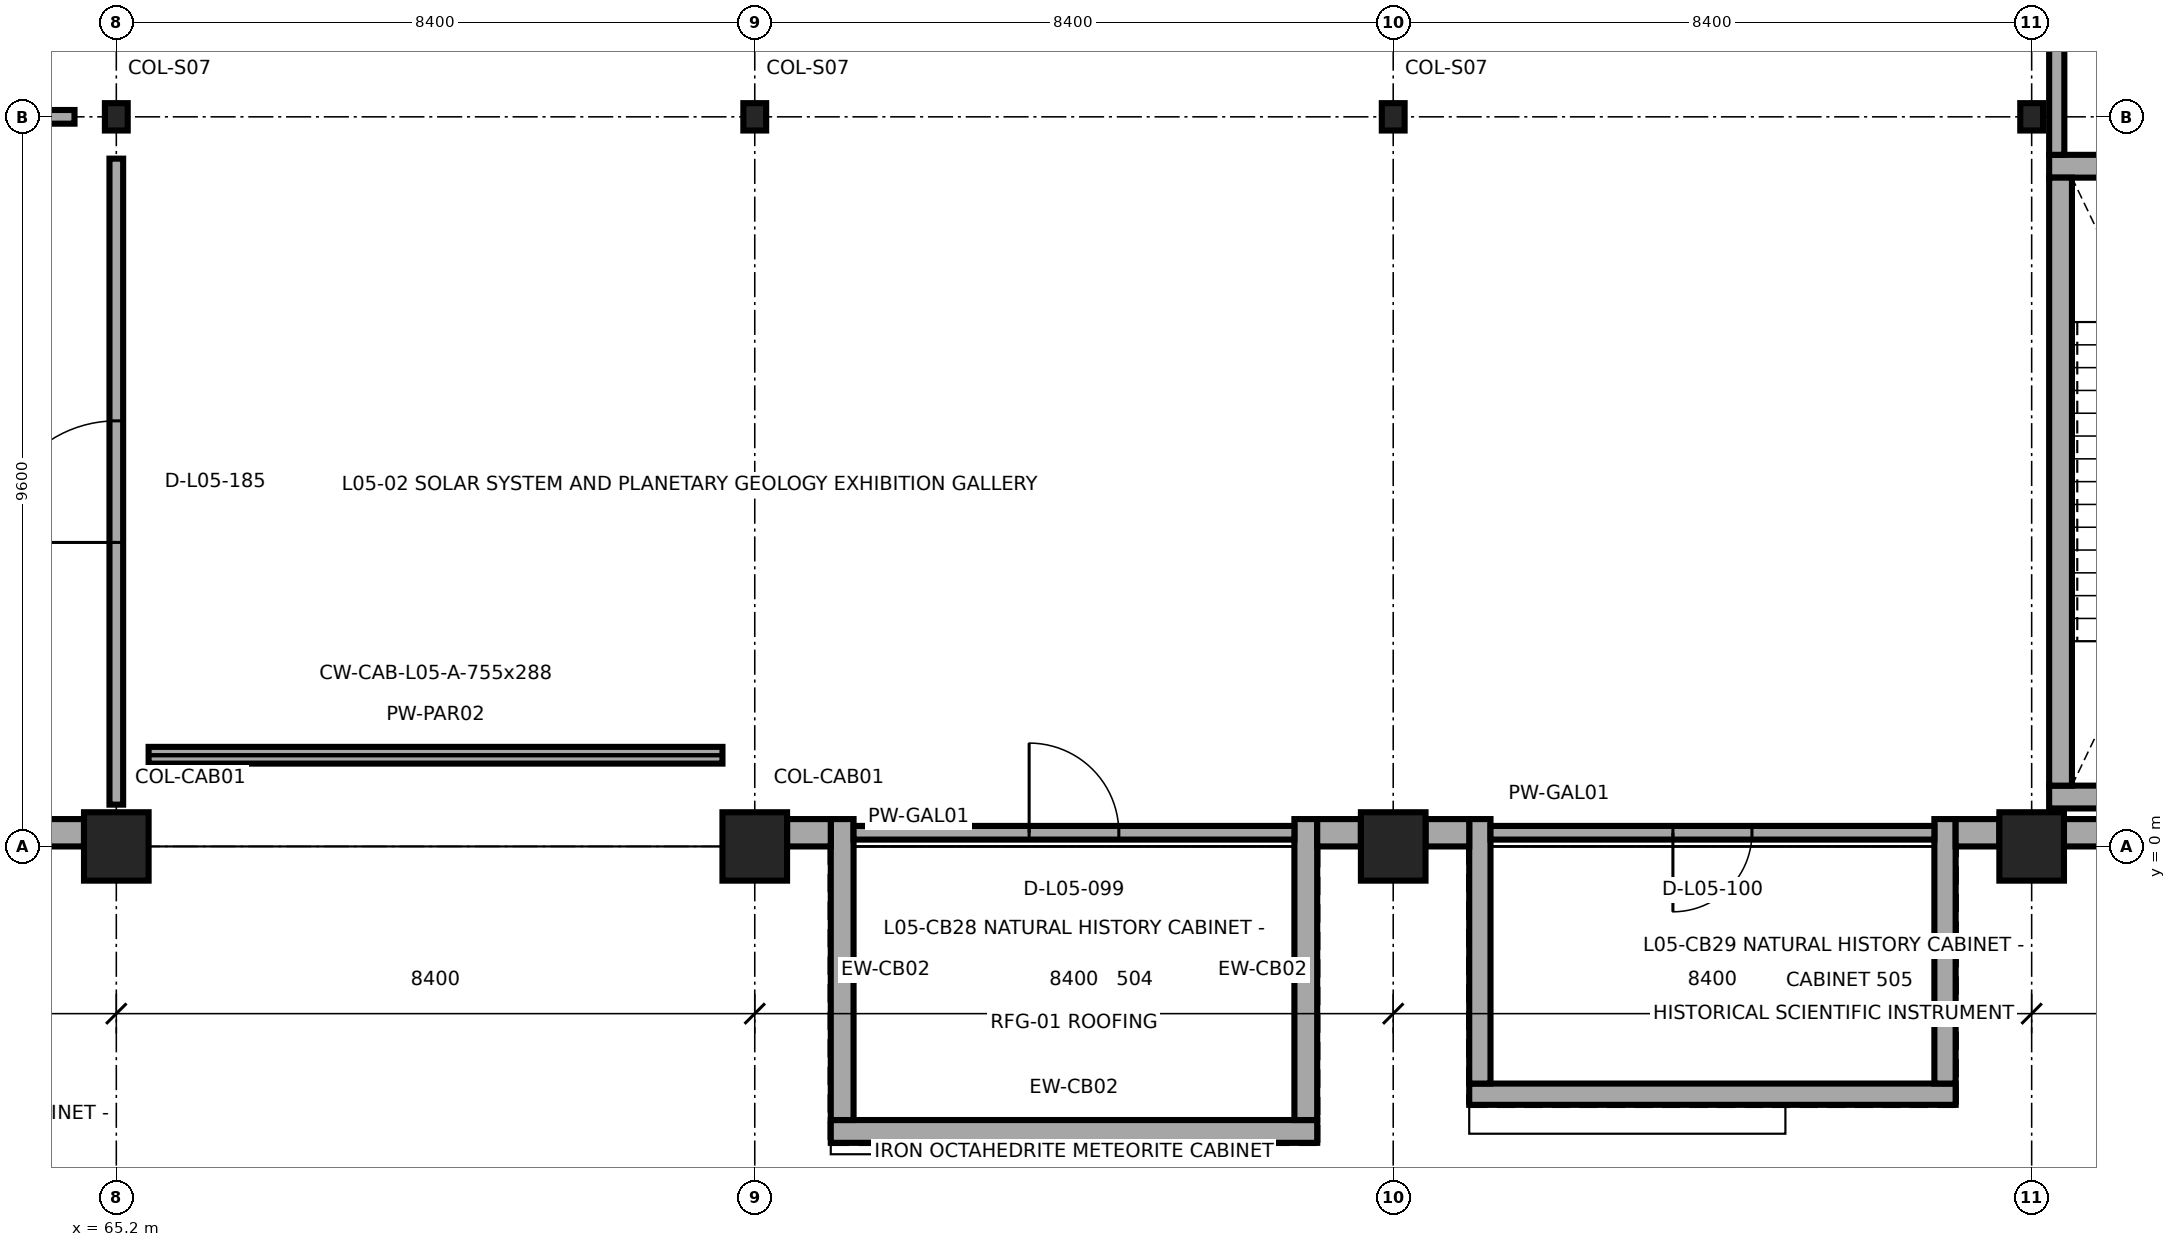
"""IFC4 building model, lengths in metres.
Left out: names, types, materials, properties, quantities, classifications, styles, units other than length and angle.
Written with IfcOpenShell. Run it as: python <this file> out.ifc"""

import sys

from ifc_helpers import new_model, si_unit, direction, frame, frame_2d, origin, origin_2d, place, context, subcontext, project, spatial, rectangle, i_section, extrude, element, fill, save


model = new_model("IFC4")
c1 = context("Model", 3, precision=1e-05, world=origin(), true_north=direction((0.0, 1.0)))
c2 = subcontext(c1, "Body", "Model", "MODEL_VIEW")
j1 = project(units=[si_unit("LENGTHUNIT", "METRE"), si_unit("PLANEANGLEUNIT", "RADIAN")], contexts=[c1])
p1 = place(None, origin())
s1 = spatial("IfcSite", under=j1, at=p1, CompositionType="ELEMENT")
p2 = place(p1, origin())
s2 = spatial("IfcBuilding", under=s1, at=p2, CompositionType="ELEMENT")
p3 = place(p2, frame((0.0, 0.0, 26.4)))
s3 = spatial("IfcBuildingStorey", under=s2, at=p3, CompositionType="ELEMENT", Elevation=26.4)
p4 = place(p3, frame((65.2, 0.0, 0.0), z_axis=(0.0, 0.0, 1.0), x_axis=(1.0, 0.0, 0.0)))
e1 = element("IfcColumn", 1, at=p4, inside=s3, PredefinedType="COLUMN", context=c2, shape_type="SweptSolid", body=[
    extrude(rectangle(XDim=0.85, YDim=0.9, at=origin_2d()), origin(), (0.0, 0.0, 1.0), 4.8),
])
p5 = place(p3, frame((65.2, 9.6, 0.0), z_axis=(0.0, 0.0, 1.0), x_axis=(1.0, 0.0, 0.0)))
e2 = element("IfcColumn", 2, at=p5, inside=s3, PredefinedType="COLUMN", context=c2, shape_type="SweptSolid", body=[
    extrude(i_section(OverallWidth=0.3, OverallDepth=0.36, WebThickness=0.012, FlangeThickness=0.022, FilletRadius=0.027, at=origin_2d()), origin(), (0.0, 0.0, 1.0), 4.8),
])
p6 = place(p3, frame((73.6, 0.0, 0.0), z_axis=(0.0, 0.0, 1.0), x_axis=(1.0, 0.0, 0.0)))
e3 = element("IfcColumn", 3, at=p6, inside=s3, PredefinedType="COLUMN", context=c2, shape_type="SweptSolid", body=[
    extrude(rectangle(XDim=0.85, YDim=0.9, at=origin_2d()), origin(), (0.0, 0.0, 1.0), 4.8),
])
p7 = place(p3, frame((73.6, 9.6, 0.0), z_axis=(0.0, 0.0, 1.0), x_axis=(1.0, 0.0, 0.0)))
e4 = element("IfcColumn", 4, at=p7, inside=s3, PredefinedType="COLUMN", context=c2, shape_type="SweptSolid", body=[
    extrude(i_section(OverallWidth=0.3, OverallDepth=0.36, WebThickness=0.012, FlangeThickness=0.022, FilletRadius=0.027, at=origin_2d()), origin(), (0.0, 0.0, 1.0), 4.8),
])
p8 = place(p3, frame((82.0, 0.0, 0.0), z_axis=(0.0, 0.0, 1.0), x_axis=(1.0, 0.0, 0.0)))
e5 = element("IfcColumn", 5, at=p8, inside=s3, PredefinedType="COLUMN", context=c2, shape_type="SweptSolid", body=[
    extrude(rectangle(XDim=0.85, YDim=0.9, at=origin_2d()), origin(), (0.0, 0.0, 1.0), 4.8),
])
p9 = place(p3, frame((82.0, 9.6, 0.0), z_axis=(0.0, 0.0, 1.0), x_axis=(1.0, 0.0, 0.0)))
e6 = element("IfcColumn", 6, at=p9, inside=s3, PredefinedType="COLUMN", context=c2, shape_type="SweptSolid", body=[
    extrude(i_section(OverallWidth=0.3, OverallDepth=0.36, WebThickness=0.012, FlangeThickness=0.022, FilletRadius=0.027, at=origin_2d()), origin(), (0.0, 0.0, 1.0), 4.8),
])
p10 = place(p3, frame((90.4, 0.0, 0.0), z_axis=(0.0, 0.0, 1.0), x_axis=(1.0, 0.0, 0.0)))
e7 = element("IfcColumn", 7, at=p10, inside=s3, PredefinedType="COLUMN", context=c2, shape_type="SweptSolid", body=[
    extrude(rectangle(XDim=0.85, YDim=0.9, at=origin_2d()), origin(), (0.0, 0.0, 1.0), 4.8),
])
p11 = place(p3, frame((90.4, 9.6, 0.0), z_axis=(0.0, 0.0, 1.0), x_axis=(1.0, 0.0, 0.0)))
e8 = element("IfcColumn", 8, at=p11, inside=s3, PredefinedType="COLUMN", context=c2, shape_type="SweptSolid", body=[
    extrude(i_section(OverallWidth=0.3, OverallDepth=0.36, WebThickness=0.012, FlangeThickness=0.022, FilletRadius=0.027, at=origin_2d()), origin(), (0.0, 0.0, 1.0), 4.8),
])
p12 = place(p3, frame((74.6, -3.75, 0.0), z_axis=(0.0, 0.0, 1.0), x_axis=(1.0, 0.0, 0.0)))
e9 = element("IfcWall", 9, at=p12, inside=s3, PredefinedType="SOLIDWALL", context=c2, shape_type="SweptSolid", body=[
    extrude(rectangle(XDim=6.4, YDim=0.3, at=frame_2d((3.2, 0.0))), origin(), (0.0, 0.0, 1.0), 2.99),
])
for number, where, z_axis, x_axis in (
    (10, (74.75, 0.36, 0.0), (0.0, 0.0, 1.0), (0.0, -1.0, 0.0)),
    (11, (80.85, -3.6, 0.0), (0.0, 0.0, 1.0), (0.0, 1.0, 0.0)),
):
    element("IfcWall", number, at=place(p3, frame(where, z_axis=z_axis, x_axis=x_axis)), inside=s3, PredefinedType="SOLIDWALL", context=c2, shape_type="SweptSolid", body=[
        extrude(rectangle(XDim=3.96, YDim=0.3, at=frame_2d((1.98, 0.0))), origin(), (0.0, 0.0, 1.0), 2.99),
    ])
p13 = place(p3, frame((83.0, -3.26, 0.0), z_axis=(0.0, 0.0, 1.0), x_axis=(1.0, 0.0, 0.0)))
e12 = element("IfcWall", 12, at=p13, inside=s3, PredefinedType="SOLIDWALL", context=c2, shape_type="SweptSolid", body=[
    extrude(rectangle(XDim=6.4, YDim=0.28, at=frame_2d((3.2, 0.0))), origin(), (0.0, 0.0, 1.0), 2.99),
])
for number, where, z_axis, x_axis in (
    (13, (83.14, 0.36, 0.0), (0.0, 0.0, 1.0), (0.0, -1.0, 0.0)),
    (14, (89.26, -3.12, 0.0), (0.0, 0.0, 1.0), (0.0, 1.0, 0.0)),
):
    element("IfcWall", number, at=place(p3, frame(where, z_axis=z_axis, x_axis=x_axis)), inside=s3, PredefinedType="SOLIDWALL", context=c2, shape_type="SweptSolid", body=[
        extrude(rectangle(XDim=3.48, YDim=0.28, at=frame_2d((1.74, 0.0))), origin(), (0.0, 0.0, 1.0), 2.99),
    ])
p14 = place(p3, frame((64.2, 0.18, 0.0), z_axis=(0.0, 0.0, 1.0), x_axis=(1.0, 0.0, 0.0)))
e15 = element("IfcWall", 15, at=p14, inside=s3, PredefinedType="SOLIDWALL", context=c2, shape_type="SweptSolid", body=[
    extrude(rectangle(XDim=0.575, YDim=0.36, at=frame_2d((0.288, 0.0))), origin(), (0.0, 0.0, 1.0), 3.625),
])
p15 = place(p3, frame((65.625, 1.2, -0.002), z_axis=(0.0, 0.0, 1.0), x_axis=(1.0, 0.0, 0.0)))
e16 = element("IfcWall", 16, at=p15, inside=s3, PredefinedType="PARAPET", context=c2, shape_type="SweptSolid", body=[
    extrude(rectangle(XDim=7.55, YDim=0.22, at=frame_2d((3.775, 0.0))), origin(), (0.0, 0.0, 1.0), 0.746),
])
p16 = place(p3, frame((74.025, 0.18, 0.0), z_axis=(0.0, 0.0, 1.0), x_axis=(1.0, 0.0, 0.0)))
e17 = element("IfcWall", 17, at=p16, inside=s3, PredefinedType="SOLIDWALL", context=c2, shape_type="SweptSolid", body=[
    extrude(rectangle(XDim=0.575, YDim=0.36, at=frame_2d((0.288, 0.0))), origin(), (0.0, 0.0, 1.0), 3.625),
])
for number, where, z_axis, x_axis in (
    (18, (81.0, 0.18, 0.0), (0.0, 0.0, 1.0), (1.0, 0.0, 0.0)),
    (19, (82.425, 0.18, 0.0), (0.0, 0.0, 1.0), (1.0, 0.0, 0.0)),
):
    element("IfcWall", number, at=place(p3, frame(where, z_axis=z_axis, x_axis=x_axis)), inside=s3, PredefinedType="SOLIDWALL", context=c2, shape_type="SweptSolid", body=[
        extrude(rectangle(XDim=0.575, YDim=0.36, at=frame_2d((0.288, 0.0))), origin(), (0.0, 0.0, 1.0), 3.625),
    ])
p17 = place(p3, frame((89.4, 0.18, 0.0), z_axis=(0.0, 0.0, 1.0), x_axis=(1.0, 0.0, 0.0)))
e20 = element("IfcWall", 20, at=p17, inside=s3, PredefinedType="SOLIDWALL", context=c2, shape_type="SweptSolid", body=[
    extrude(rectangle(XDim=0.575, YDim=0.36, at=frame_2d((0.288, 0.0))), origin(), (0.0, 0.0, 1.0), 3.625),
])
p18 = place(p3, frame((90.825, 0.18, 0.0), z_axis=(0.0, 0.0, 1.0), x_axis=(1.0, 0.0, 0.0)))
e21 = element("IfcWall", 21, at=p18, inside=s3, PredefinedType="SOLIDWALL", context=c2, shape_type="SweptSolid", body=[
    extrude(rectangle(XDim=7.55, YDim=0.36, at=frame_2d((3.775, 0.0))), origin(), (0.0, 0.0, 1.0), 3.625),
])
p19 = place(p3, frame((90.63, 0.65, 0.0), z_axis=(0.0, 0.0, 1.0), x_axis=(1.0, 0.0, 0.0)))
e22 = element("IfcWall", 22, at=p19, inside=s3, PredefinedType="SHEAR", context=c2, shape_type="SweptSolid", body=[
    extrude(rectangle(XDim=7.94, YDim=0.3, at=frame_2d((3.97, 0.0))), origin(), (0.0, 0.0, 1.0), 4.54),
])
p20 = place(p3, frame((98.57, 8.95, 0.0), z_axis=(0.0, 0.0, 1.0), x_axis=(-1.0, 0.0, 0.0)))
e23 = element("IfcWall", 23, at=p20, inside=s3, PredefinedType="SHEAR", context=c2, shape_type="SweptSolid", body=[
    extrude(rectangle(XDim=7.94, YDim=0.3, at=frame_2d((3.97, 0.0))), origin(), (0.0, 0.0, 1.0), 4.54),
])
p21 = place(p20, frame((5.17, 0.0, 0.0)))
e24 = element("IfcOpeningElement", 24, at=p21, cuts=e23, PredefinedType="OPENING", context=c2, shape_type="SweptSolid", body=[
    extrude(rectangle(XDim=1.1, YDim=2.2, at=frame_2d((0.55, 1.1))), frame((0.0, 0.16, 0.0), z_axis=(0.0, -1.0, 0.0), x_axis=(1.0, 0.0, 0.0)), (0.0, 0.0, 1.0), 0.32),
])
p22 = place(p20, frame((2.09, 0.0, 0.0)))
e25 = element("IfcOpeningElement", 25, at=p22, cuts=e23, PredefinedType="OPENING", context=c2, shape_type="SweptSolid", body=[
    extrude(rectangle(XDim=1.1, YDim=2.1, at=frame_2d((0.55, 1.05))), frame((0.0, 0.16, 0.0), z_axis=(0.0, -1.0, 0.0), x_axis=(1.0, 0.0, 0.0)), (0.0, 0.0, 1.0), 0.32),
])
p23 = place(p20, frame((0.365, 0.0, 0.0)))
e26 = element("IfcOpeningElement", 26, at=p23, cuts=e23, PredefinedType="OPENING", context=c2, shape_type="SweptSolid", body=[
    extrude(rectangle(XDim=1.1, YDim=2.1, at=frame_2d((0.55, 1.05))), frame((0.0, 0.16, 0.0), z_axis=(0.0, -1.0, 0.0), x_axis=(1.0, 0.0, 0.0)), (0.0, 0.0, 1.0), 0.32),
])
p24 = place(p3, frame((90.78, 8.8, 0.0), z_axis=(0.0, 0.0, 1.0), x_axis=(0.0, -1.0, 0.0)))
e27 = element("IfcWall", 27, at=p24, inside=s3, PredefinedType="SHEAR", context=c2, shape_type="SweptSolid", body=[
    extrude(rectangle(XDim=8.0, YDim=0.3, at=frame_2d((4.0, 0.0))), origin(), (0.0, 0.0, 1.0), 4.54),
])
p25 = place(p3, frame((90.73, 9.1, 0.0), z_axis=(0.0, 0.0, 1.0), x_axis=(0.0, 1.0, 0.0)))
e28 = element("IfcWall", 28, at=p25, inside=s3, PredefinedType="SOLIDWALL", context=c2, shape_type="SweptSolid", body=[
    extrude(rectangle(XDim=2.9, YDim=0.2, at=frame_2d((1.45, 0.0))), origin(), (0.0, 0.0, 1.0), 4.022),
])
p26 = place(p3, frame((74.9, 0.18, 0.0), z_axis=(0.0, 0.0, 1.0), x_axis=(1.0, 0.0, 0.0)))
e29 = element("IfcWall", 29, at=p26, inside=s3, PredefinedType="PARTITIONING", context=c2, shape_type="SweptSolid", body=[
    extrude(rectangle(XDim=5.8, YDim=0.18, at=frame_2d((2.9, 0.0))), origin(), (0.0, 0.0, 1.0), 2.99),
])
p27 = place(p26, frame((2.31, 0.0, 0.0)))
e30 = element("IfcOpeningElement", 30, at=p27, cuts=e29, PredefinedType="OPENING", context=c2, shape_type="SweptSolid", body=[
    extrude(rectangle(XDim=1.18, YDim=2.25, at=frame_2d((0.59, 1.125))), frame((0.0, 0.1, 0.0), z_axis=(0.0, -1.0, 0.0), x_axis=(1.0, 0.0, 0.0)), (0.0, 0.0, 1.0), 0.2),
])
p28 = place(p3, frame((83.28, 0.18, 0.0), z_axis=(0.0, 0.0, 1.0), x_axis=(1.0, 0.0, 0.0)))
e31 = element("IfcWall", 31, at=p28, inside=s3, PredefinedType="PARTITIONING", context=c2, shape_type="SweptSolid", body=[
    extrude(rectangle(XDim=5.84, YDim=0.18, at=frame_2d((2.92, 0.0))), origin(), (0.0, 0.0, 1.0), 2.99),
])
p29 = place(p28, frame((2.4, 0.0, 0.0)))
e32 = element("IfcOpeningElement", 32, at=p29, cuts=e31, PredefinedType="OPENING", context=c2, shape_type="SweptSolid", body=[
    extrude(rectangle(XDim=1.04, YDim=2.18, at=frame_2d((0.52, 1.09))), frame((0.0, 0.1, 0.0), z_axis=(0.0, -1.0, 0.0), x_axis=(1.0, 0.0, 0.0)), (0.0, 0.0, 1.0), 0.2),
])
p30 = place(p3, frame((57.35, 9.6, 0.0), z_axis=(0.0, 0.0, 1.0), x_axis=(1.0, 0.0, 0.0)))
e33 = element("IfcWall", 33, at=p30, inside=s3, PredefinedType="PARTITIONING", context=c2, shape_type="SweptSolid", body=[
    extrude(rectangle(XDim=7.3, YDim=0.18, at=frame_2d((3.65, 0.0))), origin(), (0.0, 0.0, 1.0), 2.992),
])
p31 = place(p30, frame((2.7, 0.0, 0.0)))
e34 = element("IfcOpeningElement", 34, at=p31, cuts=e33, PredefinedType="OPENING", context=c2, shape_type="SweptSolid", body=[
    extrude(rectangle(XDim=1.9, YDim=2.45, at=frame_2d((0.95, 1.225))), frame((0.0, 0.1, 0.0), z_axis=(0.0, -1.0, 0.0), x_axis=(1.0, 0.0, 0.0)), (0.0, 0.0, 1.0), 0.2),
])
p32 = place(p3, frame((65.2, 0.55, 0.0), z_axis=(0.0, 0.0, 1.0), x_axis=(0.0, 1.0, 0.0)))
e35 = element("IfcWall", 35, at=p32, inside=s3, PredefinedType="PARTITIONING", context=c2, shape_type="SweptSolid", body=[
    extrude(rectangle(XDim=8.5, YDim=0.18, at=frame_2d((4.25, 0.0))), origin(), (0.0, 0.0, 1.0), 4.232),
])
p33 = place(p32, frame((3.45, 0.0, 0.0)))
e36 = element("IfcOpeningElement", 36, at=p33, cuts=e35, PredefinedType="OPENING", context=c2, shape_type="SweptSolid", body=[
    extrude(rectangle(XDim=1.6, YDim=2.4, at=frame_2d((0.8, 1.2))), frame((0.0, 0.1, 0.0), z_axis=(0.0, -1.0, 0.0), x_axis=(1.0, 0.0, 0.0)), (0.0, 0.0, 1.0), 0.2),
])
p34 = place(p27, origin())
e37 = element("IfcDoor", 37, at=p34, inside=s3, OperationType="SINGLE_SWING_LEFT", PredefinedType="DOOR", context=c2, shape_type="SweptSolid", body=[
    extrude(rectangle(XDim=1.18, YDim=2.25, at=frame_2d((0.59, 1.125))), frame((0.0, 0.025, 0.0), z_axis=(0.0, -1.0, 0.0), x_axis=(1.0, 0.0, 0.0)), (0.0, 0.0, 1.0), 0.05),
])
fill(e30, e37)
p35 = place(p29, origin())
e38 = element("IfcDoor", 38, at=p35, inside=s3, OperationType="SINGLE_SWING_RIGHT", PredefinedType="DOOR", context=c2, shape_type="SweptSolid", body=[
    extrude(rectangle(XDim=1.04, YDim=2.18, at=frame_2d((0.52, 1.09))), frame((0.0, 0.025, 0.0), z_axis=(0.0, -1.0, 0.0), x_axis=(1.0, 0.0, 0.0)), (0.0, 0.0, 1.0), 0.05),
])
fill(e32, e38)
p36 = place(p33, origin())
e39 = element("IfcDoor", 39, at=p36, inside=s3, OperationType="DOUBLE_DOOR_SINGLE_SWING", PredefinedType="DOOR", context=c2, shape_type="SweptSolid", body=[
    extrude(rectangle(XDim=1.6, YDim=2.4, at=frame_2d((0.8, 1.2))), frame((0.0, 0.025, 0.0), z_axis=(0.0, -1.0, 0.0), x_axis=(1.0, 0.0, 0.0)), (0.0, 0.0, 1.0), 0.05),
])
fill(e36, e39)
save(model, sys.argv[1])
